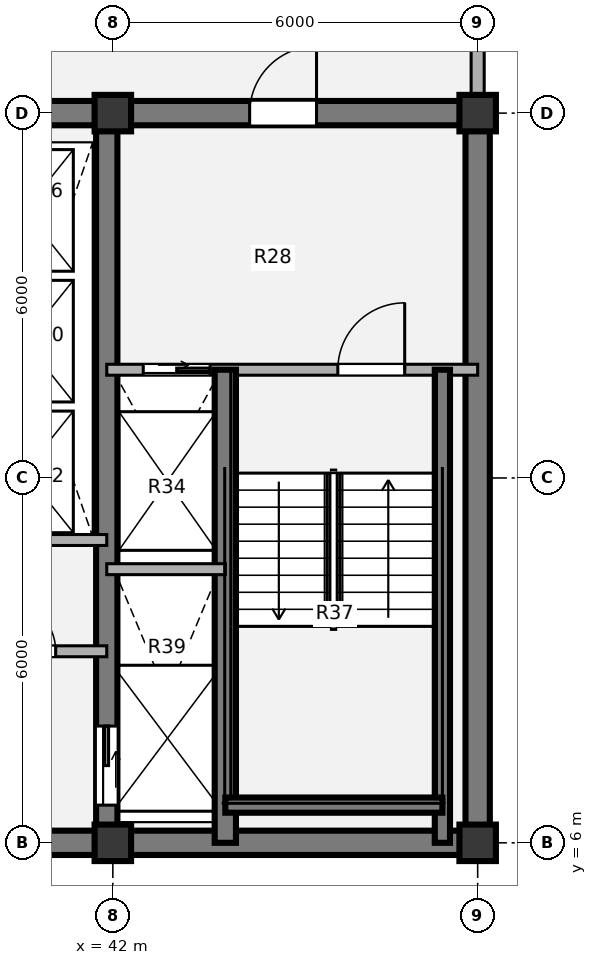
"""IFC4 building model, lengths in metres.
Left out: names, types, materials, properties, quantities, classifications, styles, units other than length and angle.
Written with IfcOpenShell. Run it as: python <this file> out.ifc"""

import sys

from ifc_helpers import new_model, si_unit, direction, frame, frame_2d, origin, origin_2d, place, context, subcontext, project, spatial, rectangle, extrude, source, transform, mapped, element, fill, save


model = new_model("IFC4")
c1 = context("Model", 3, precision=1e-05, world=origin(), true_north=direction((0.0, 1.0)))
c2 = subcontext(c1, "Body", "Model", "MODEL_VIEW")
j1 = project(units=[si_unit("LENGTHUNIT", "METRE"), si_unit("PLANEANGLEUNIT", "RADIAN")], contexts=[c1])
p1 = place(None, origin())
s1 = spatial("IfcSite", under=j1, at=p1, CompositionType="ELEMENT")
p2 = place(p1, origin())
s2 = spatial("IfcBuilding", under=s1, at=p2, CompositionType="ELEMENT")
p3 = place(p2, frame((0.0, 0.0, 268.38)))
s3 = spatial("IfcBuildingStorey", under=s2, at=p3, CompositionType="ELEMENT", Elevation=268.38)
m1 = source(origin(), c2, "Body", "SweptSolid", [
    extrude(rectangle(XDim=0.6, YDim=0.6, at=origin_2d()), origin(), (0.0, 0.0, 1.0), 3.78),
])
for number, where, z_axis, x_axis in (
    (1, (42.0, 6.0, 0.0), (0.0, 0.0, 1.0), (1.0, 0.0, 0.0)),
    (2, (48.0, 6.0, 0.0), (0.0, 0.0, 1.0), (1.0, 0.0, 0.0)),
    (3, (42.0, 18.0, 0.0), (0.0, 0.0, 1.0), (1.0, 0.0, 0.0)),
    (4, (48.0, 18.0, 0.0), (0.0, 0.0, 1.0), (1.0, 0.0, 0.0)),
):
    element("IfcColumn", number, at=place(p3, frame(where, z_axis=z_axis, x_axis=x_axis)), inside=s3, PredefinedType="COLUMN", context=c2, shape_type="MappedRepresentation", body=[
        mapped(m1, transform((0.0, 0.0, 0.0), x_axis=(1.0, 0.0, 0.0), y_axis=(0.0, 1.0, 0.0), z_axis=(0.0, 0.0, 1.0), scale=1.0)),
    ])
p4 = place(p3, frame((48.2, 6.0, 0.0), z_axis=(0.0, 0.0, 1.0), x_axis=(-1.0, 0.0, 0.0)))
e5 = element("IfcWall", 5, at=p4, inside=s3, PredefinedType="SHEAR", context=c2, shape_type="SweptSolid", body=[
    extrude(rectangle(XDim=24.4, YDim=0.4, at=frame_2d((12.2, 0.0))), origin(), (0.0, 0.0, 1.0), 3.78),
])
p5 = place(p3, frame((48.0, 18.0, 0.0), z_axis=(0.0, 0.0, 1.0), x_axis=(0.0, -1.0, 0.0)))
e6 = element("IfcWall", 6, at=p5, inside=s3, PredefinedType="SHEAR", context=c2, shape_type="SweptSolid", body=[
    extrude(rectangle(XDim=12.0, YDim=0.4, at=frame_2d((6.0, 0.0))), origin(), (0.0, 0.0, 1.0), 3.78),
])
p6 = place(p3, frame((38.8, 18.0, 0.0), z_axis=(0.0, 0.0, 1.0), x_axis=(1.0, 0.0, 0.0)))
e7 = element("IfcWall", 7, at=p6, inside=s3, PredefinedType="SHEAR", context=c2, shape_type="SweptSolid", body=[
    extrude(rectangle(XDim=9.4, YDim=0.4, at=frame_2d((4.7, 0.0))), origin(), (0.0, 0.0, 1.0), 3.78),
])
p7 = place(p6, frame((5.45, 0.0, 0.0)))
e8 = element("IfcOpeningElement", 8, at=p7, cuts=e7, PredefinedType="OPENING", context=c2, shape_type="SweptSolid", body=[
    extrude(rectangle(XDim=1.1, YDim=2.1, at=origin_2d()), frame((0.55, 0.21, 1.05), z_axis=(0.0, -1.0, 0.0), x_axis=(1.0, 0.0, 0.0)), (0.0, 0.0, 1.0), 0.42),
])
p8 = place(p3, frame((41.9, 18.0, 0.0), z_axis=(0.0, 0.0, 1.0), x_axis=(0.0, -1.0, 0.0)))
e9 = element("IfcWall", 9, at=p8, inside=s3, PredefinedType="SHEAR", context=c2, shape_type="SweptSolid", body=[
    extrude(rectangle(XDim=12.0, YDim=0.35, at=frame_2d((6.0, 0.0))), origin(), (0.0, 0.0, 1.0), 3.78),
])
p9 = place(p8, frame((10.08, 0.0, 0.0)))
e10 = element("IfcOpeningElement", 10, at=p9, cuts=e9, PredefinedType="OPENING", context=c2, shape_type="SweptSolid", body=[
    extrude(rectangle(XDim=1.3, YDim=2.1, at=origin_2d()), frame((0.65, 0.185, 1.05), z_axis=(0.0, -1.0, 0.0), x_axis=(1.0, 0.0, 0.0)), (0.0, 0.0, 1.0), 0.37),
])
p10 = place(p3, frame((48.0, 21.05, 0.0), z_axis=(0.0, 0.0, 1.0), x_axis=(0.0, -1.0, 0.0)))
e11 = element("IfcWall", 11, at=p10, inside=s3, PredefinedType="SOLIDWALL", context=c2, shape_type="SweptSolid", body=[
    extrude(rectangle(XDim=2.77, YDim=0.215, at=frame_2d((1.385, 0.0))), origin(), (0.0, 0.0, 1.0), 2.718),
])
p11 = place(p3, frame((39.35, 10.98, 0.0), z_axis=(0.0, 0.0, 1.0), x_axis=(1.0, 0.0, 0.0)))
e12 = element("IfcWall", 12, at=p11, inside=s3, PredefinedType="PARTITIONING", context=c2, shape_type="SweptSolid", body=[
    extrude(rectangle(XDim=2.55, YDim=0.18, at=frame_2d((1.275, 0.0))), origin(), (0.0, 0.0, 1.0), 3.5),
])
p12 = place(p3, frame((39.35, 9.15, 0.0), z_axis=(0.0, 0.0, 1.0), x_axis=(1.0, 0.0, 0.0)))
e13 = element("IfcWall", 13, at=p12, inside=s3, PredefinedType="PARTITIONING", context=c2, shape_type="SweptSolid", body=[
    extrude(rectangle(XDim=2.55, YDim=0.18, at=frame_2d((1.275, 0.0))), origin(), (0.0, 0.0, 1.0), 3.5),
])
p13 = place(p12, frame((0.85, 0.0, 0.0)))
e14 = element("IfcOpeningElement", 14, at=p13, cuts=e13, PredefinedType="OPENING", context=c2, shape_type="SweptSolid", body=[
    extrude(rectangle(XDim=0.86, YDim=2.1, at=origin_2d()), frame((0.43, 0.1, 1.05), z_axis=(0.0, -1.0, 0.0), x_axis=(1.0, 0.0, 0.0)), (0.0, 0.0, 1.0), 0.2),
])
p14 = place(p3, frame((41.9, 13.78, 0.0), z_axis=(0.0, 0.0, 1.0), x_axis=(1.0, 0.0, 0.0)))
e15 = element("IfcWall", 15, at=p14, inside=s3, PredefinedType="PARTITIONING", context=c2, shape_type="SweptSolid", body=[
    extrude(rectangle(XDim=6.1, YDim=0.18, at=frame_2d((3.05, 0.0))), origin(), (0.0, 0.0, 1.0), 3.5),
])
p15 = place(p14, frame((0.6, 0.0, 0.0)))
e16 = element("IfcOpeningElement", 16, at=p15, cuts=e15, PredefinedType="OPENING", context=c2, shape_type="SweptSolid", body=[
    extrude(rectangle(XDim=1.1, YDim=2.1, at=origin_2d()), frame((0.55, 0.1, 1.05), z_axis=(0.0, -1.0, 0.0), x_axis=(1.0, 0.0, 0.0)), (0.0, 0.0, 1.0), 0.2),
])
p16 = place(p14, frame((3.8, 0.0, 0.0)))
e17 = element("IfcOpeningElement", 17, at=p16, cuts=e15, PredefinedType="OPENING", context=c2, shape_type="SweptSolid", body=[
    extrude(rectangle(XDim=1.1, YDim=2.1, at=origin_2d()), frame((0.55, 0.1, 1.05), z_axis=(0.0, -1.0, 0.0), x_axis=(1.0, 0.0, 0.0)), (0.0, 0.0, 1.0), 0.2),
])
p17 = place(p3, frame((43.85, 6.0, 0.0), z_axis=(0.0, 0.0, 1.0), x_axis=(0.0, 1.0, 0.0)))
e18 = element("IfcWall", 18, at=p17, inside=s3, PredefinedType="SHEAR", context=c2, shape_type="SweptSolid", body=[
    extrude(rectangle(XDim=7.78, YDim=0.35, at=frame_2d((3.89, 0.0))), origin(), (0.0, 0.0, 1.0), 3.85),
])
p18 = place(p3, frame((47.42, 6.0, 0.0), z_axis=(0.0, 0.0, 1.0), x_axis=(0.0, 1.0, 0.0)))
e19 = element("IfcWall", 19, at=p18, inside=s3, PredefinedType="SHEAR", context=c2, shape_type="SweptSolid", body=[
    extrude(rectangle(XDim=7.78, YDim=0.25, at=frame_2d((3.89, 0.0))), origin(), (0.0, 0.0, 1.0), 3.85),
])
p19 = place(p3, frame((43.85, 6.62, 0.0), z_axis=(0.0, 0.0, 1.0), x_axis=(1.0, 0.0, 0.0)))
e20 = element("IfcWall", 20, at=p19, inside=s3, PredefinedType="SHEAR", context=c2, shape_type="SweptSolid", body=[
    extrude(rectangle(XDim=3.57, YDim=0.25, at=frame_2d((1.785, 0.0))), origin(), (0.0, 0.0, 1.0), 3.85),
])
p20 = place(p3, frame((41.9, 10.5, 0.0), z_axis=(0.0, 0.0, 1.0), x_axis=(1.0, 0.0, 0.0)))
e21 = element("IfcWall", 21, at=p20, inside=s3, PredefinedType="PARTITIONING", context=c2, shape_type="SweptSolid", body=[
    extrude(rectangle(XDim=1.95, YDim=0.18, at=frame_2d((0.975, 0.0))), origin(), (0.0, 0.0, 1.0), 3.5),
])
m2 = source(origin(), c2, "Body", "SweptSolid", [
    extrude(rectangle(XDim=0.86, YDim=2.1, at=origin_2d()), frame((0.43, 0.025, 1.05), z_axis=(0.0, -1.0, 0.0), x_axis=(1.0, 0.0, 0.0)), (0.0, 0.0, 1.0), 0.05),
])
p21 = place(p13, origin())
e22 = element("IfcDoor", 22, at=p21, inside=s3, OperationType="SINGLE_SWING_LEFT", PredefinedType="DOOR", context=c2, shape_type="MappedRepresentation", body=[
    mapped(m2, transform((0.0, 0.0, 0.0), x_axis=(1.0, 0.0, 0.0), y_axis=(0.0, 1.0, 0.0), z_axis=(0.0, 0.0, 1.0), scale=1.0)),
])
fill(e14, e22)
m3 = source(origin(), c2, "Body", "SweptSolid", [
    extrude(rectangle(XDim=1.1, YDim=2.1, at=origin_2d()), frame((0.55, 0.025, 1.05), z_axis=(0.0, -1.0, 0.0), x_axis=(1.0, 0.0, 0.0)), (0.0, 0.0, 1.0), 0.05),
])
p22 = place(p15, origin())
e23 = element("IfcDoor", 23, at=p22, inside=s3, OperationType="SLIDING_TO_RIGHT", PredefinedType="DOOR", context=c2, shape_type="MappedRepresentation", body=[
    mapped(m3, transform((0.0, 0.0, 0.0), x_axis=(1.0, 0.0, 0.0), y_axis=(0.0, 1.0, 0.0), z_axis=(0.0, 0.0, 1.0), scale=1.0)),
])
fill(e16, e23)
m4 = source(origin(), c2, "Body", "SweptSolid", [
    extrude(rectangle(XDim=1.1, YDim=2.1, at=origin_2d()), frame((0.55, 0.025, 1.05), z_axis=(0.0, -1.0, 0.0), x_axis=(1.0, 0.0, 0.0)), (0.0, 0.0, 1.0), 0.05),
])
p23 = place(p16, origin())
e24 = element("IfcDoor", 24, at=p23, inside=s3, OperationType="SINGLE_SWING_RIGHT", PredefinedType="DOOR", context=c2, shape_type="MappedRepresentation", body=[
    mapped(m4, transform((0.0, 0.0, 0.0), x_axis=(1.0, 0.0, 0.0), y_axis=(0.0, 1.0, 0.0), z_axis=(0.0, 0.0, 1.0), scale=1.0)),
])
fill(e17, e24)
m5 = source(origin(), c2, "Body", "SweptSolid", [
    extrude(rectangle(XDim=1.3, YDim=2.1, at=origin_2d()), frame((0.65, 0.025, 1.05), z_axis=(0.0, -1.0, 0.0), x_axis=(1.0, 0.0, 0.0)), (0.0, 0.0, 1.0), 0.05),
])
p24 = place(p9, origin())
e25 = element("IfcDoor", 25, at=p24, inside=s3, OperationType="SLIDING_TO_LEFT", PredefinedType="DOOR", context=c2, shape_type="MappedRepresentation", body=[
    mapped(m5, transform((0.0, 0.0, 0.0), x_axis=(1.0, 0.0, 0.0), y_axis=(0.0, 1.0, 0.0), z_axis=(0.0, 0.0, 1.0), scale=1.0)),
])
fill(e10, e25)
m6 = source(origin(), c2, "Body", "SweptSolid", [
    extrude(rectangle(XDim=1.1, YDim=2.1, at=origin_2d()), frame((0.55, 0.025, 1.05), z_axis=(0.0, -1.0, 0.0), x_axis=(1.0, 0.0, 0.0)), (0.0, 0.0, 1.0), 0.05),
])
p25 = place(p7, origin())
e26 = element("IfcDoor", 26, at=p25, inside=s3, OperationType="SINGLE_SWING_RIGHT", PredefinedType="DOOR", context=c2, shape_type="MappedRepresentation", body=[
    mapped(m6, transform((0.0, 0.0, 0.0), x_axis=(1.0, 0.0, 0.0), y_axis=(0.0, 1.0, 0.0), z_axis=(0.0, 0.0, 1.0), scale=1.0)),
])
fill(e8, e26)
save(model, sys.argv[1])
